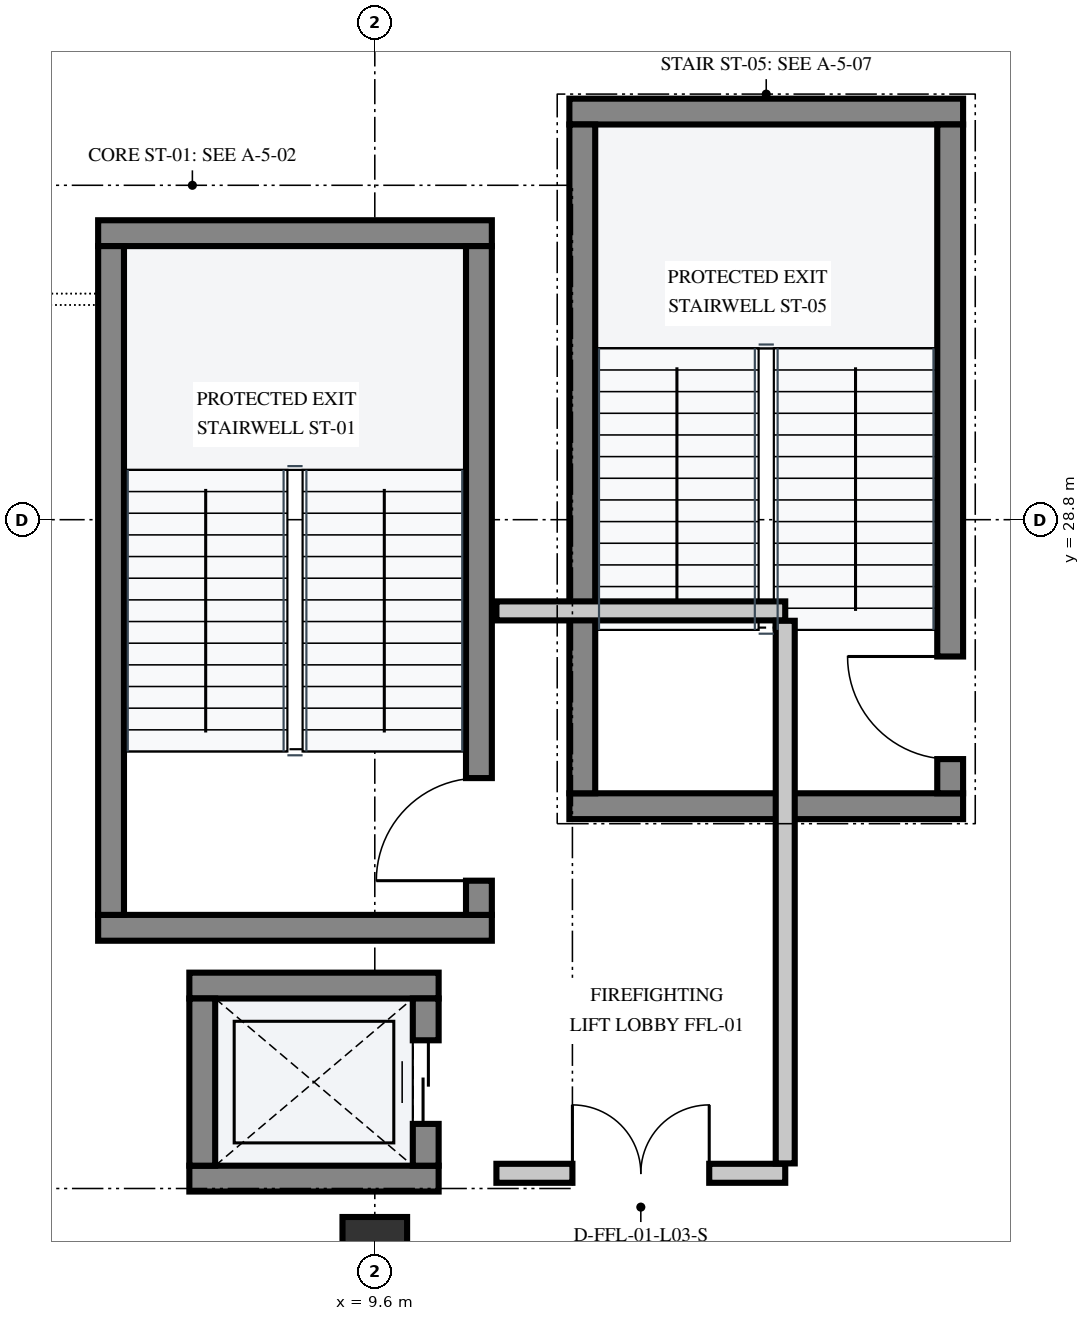
"""IFC4 building model, lengths in metres.
Left out: names, types, materials, properties, quantities, classifications, styles, units other than length and angle.
Written with IfcOpenShell. Run it as: python <this file> out.ifc"""

import sys

from ifc_helpers import new_model, si_unit, direction, frame, frame_2d, origin, origin_2d, place, context, subcontext, project, spatial, rectangle, extrude, element, fill, save


model = new_model("IFC4")
c1 = context("Model", 3, precision=1e-05, world=origin(), true_north=direction((0.0, 1.0)))
c2 = subcontext(c1, "Body", "Model", "MODEL_VIEW")
j1 = project(units=[si_unit("LENGTHUNIT", "METRE"), si_unit("PLANEANGLEUNIT", "RADIAN")], contexts=[c1])
p1 = place(None, origin())
s1 = spatial("IfcSite", under=j1, at=p1, CompositionType="ELEMENT")
p2 = place(p1, origin())
s2 = spatial("IfcBuilding", under=s1, at=p2, CompositionType="ELEMENT")
p3 = place(p2, frame((0.0, 0.0, 15.0)))
s3 = spatial("IfcBuildingStorey", under=s2, at=p3, CompositionType="ELEMENT", Elevation=15.0)
p4 = place(p3, frame((9.6, 19.2, 0.0), z_axis=(0.0, 0.0, 1.0), x_axis=(1.0, 0.0, 0.0)))
e1 = element("IfcColumn", 1, at=p4, inside=s3, PredefinedType="COLUMN", context=c2, shape_type="SweptSolid", body=[
    extrude(rectangle(XDim=0.85, YDim=0.85, at=origin_2d()), origin(), (0.0, 0.0, 1.0), 4.8),
])
for number, where, z_axis, x_axis in (
    (2, (5.96, 23.43, 0.0), (0.0, 0.0, 1.0), (1.0, 0.0, 0.0)),
    (3, (5.96, 32.57, 0.0), (0.0, 0.0, 1.0), (1.0, 0.0, 0.0)),
):
    element("IfcWall", number, at=place(p3, frame(where, z_axis=z_axis, x_axis=x_axis)), inside=s3, PredefinedType="SHEAR", context=c2, shape_type="SweptSolid", body=[
        extrude(rectangle(XDim=5.18, YDim=0.34, at=frame_2d((2.59, 0.0))), origin(), (0.0, 0.0, 1.0), 4.52),
    ])
p5 = place(p3, frame((10.97, 23.6, 0.0), z_axis=(0.0, 0.0, 1.0), x_axis=(0.0, 1.0, 0.0)))
e4 = element("IfcWall", 4, at=p5, inside=s3, PredefinedType="SHEAR", context=c2, shape_type="SweptSolid", body=[
    extrude(rectangle(XDim=8.8, YDim=0.34, at=frame_2d((4.4, 0.0))), origin(), (0.0, 0.0, 1.0), 4.52),
])
p6 = place(p5, frame((0.45, 0.0, 0.0)))
e5 = element("IfcOpeningElement", 5, at=p6, cuts=e4, PredefinedType="OPENING", context=c2, shape_type="SweptSolid", body=[
    extrude(rectangle(XDim=1.35, YDim=2.2, at=frame_2d((0.675, 1.1))), frame((0.0, 0.182, 0.0), z_axis=(0.0, -1.0, 0.0), x_axis=(1.0, 0.0, 0.0)), (0.0, 0.0, 1.0), 0.364),
])
p7 = place(p3, frame((6.13, 23.6, 0.0), z_axis=(0.0, 0.0, 1.0), x_axis=(0.0, 1.0, 0.0)))
e6 = element("IfcWall", 6, at=p7, inside=s3, PredefinedType="SHEAR", context=c2, shape_type="SweptSolid", body=[
    extrude(rectangle(XDim=8.8, YDim=0.34, at=frame_2d((4.4, 0.0))), origin(), (0.0, 0.0, 1.0), 4.52),
])
for number, where, z_axis, x_axis in (
    (7, (12.16, 25.03, 0.0), (0.0, 0.0, 1.0), (1.0, 0.0, 0.0)),
    (8, (12.16, 34.17, 0.0), (0.0, 0.0, 1.0), (1.0, 0.0, 0.0)),
):
    element("IfcWall", number, at=place(p3, frame(where, z_axis=z_axis, x_axis=x_axis)), inside=s3, PredefinedType="SHEAR", context=c2, shape_type="SweptSolid", body=[
        extrude(rectangle(XDim=5.18, YDim=0.34, at=frame_2d((2.59, 0.0))), origin(), (0.0, 0.0, 1.0), 4.52),
    ])
p8 = place(p3, frame((17.17, 25.2, 0.0), z_axis=(0.0, 0.0, 1.0), x_axis=(0.0, 1.0, 0.0)))
e9 = element("IfcWall", 9, at=p8, inside=s3, PredefinedType="SHEAR", context=c2, shape_type="SweptSolid", body=[
    extrude(rectangle(XDim=8.8, YDim=0.34, at=frame_2d((4.4, 0.0))), origin(), (0.0, 0.0, 1.0), 4.52),
])
p9 = place(p8, frame((0.45, 0.0, 0.0)))
e10 = element("IfcOpeningElement", 10, at=p9, cuts=e9, PredefinedType="OPENING", context=c2, shape_type="SweptSolid", body=[
    extrude(rectangle(XDim=1.35, YDim=2.2, at=frame_2d((0.675, 1.1))), frame((0.0, 0.182, 0.0), z_axis=(0.0, -1.0, 0.0), x_axis=(1.0, 0.0, 0.0)), (0.0, 0.0, 1.0), 0.364),
])
p10 = place(p3, frame((12.33, 25.2, 0.0), z_axis=(0.0, 0.0, 1.0), x_axis=(0.0, 1.0, 0.0)))
e11 = element("IfcWall", 11, at=p10, inside=s3, PredefinedType="SHEAR", context=c2, shape_type="SweptSolid", body=[
    extrude(rectangle(XDim=8.8, YDim=0.34, at=frame_2d((4.4, 0.0))), origin(), (0.0, 0.0, 1.0), 4.52),
])
for number, where, z_axis, x_axis in (
    (12, (7.16, 20.13, 0.0), (0.0, 0.0, 1.0), (1.0, 0.0, 0.0)),
    (13, (7.16, 22.67, 0.0), (0.0, 0.0, 1.0), (1.0, 0.0, 0.0)),
):
    element("IfcWall", number, at=place(p3, frame(where, z_axis=z_axis, x_axis=x_axis)), inside=s3, PredefinedType="SHEAR", context=c2, shape_type="SweptSolid", body=[
        extrude(rectangle(XDim=3.28, YDim=0.34, at=frame_2d((1.64, 0.0))), origin(), (0.0, 0.0, 1.0), 4.52),
    ])
p11 = place(p3, frame((7.33, 20.3, 0.0), z_axis=(0.0, 0.0, 1.0), x_axis=(0.0, 1.0, 0.0)))
e14 = element("IfcWall", 14, at=p11, inside=s3, PredefinedType="SHEAR", context=c2, shape_type="SweptSolid", body=[
    extrude(rectangle(XDim=2.2, YDim=0.34, at=frame_2d((1.1, 0.0))), origin(), (0.0, 0.0, 1.0), 4.52),
])
p12 = place(p3, frame((10.27, 20.3, 0.0), z_axis=(0.0, 0.0, 1.0), x_axis=(0.0, 1.0, 0.0)))
e15 = element("IfcWall", 15, at=p12, inside=s3, PredefinedType="SHEAR", context=c2, shape_type="SweptSolid", body=[
    extrude(rectangle(XDim=2.2, YDim=0.34, at=frame_2d((1.1, 0.0))), origin(), (0.0, 0.0, 1.0), 4.52),
])
p13 = place(p12, frame((0.55, 0.0, 0.0)))
e16 = element("IfcOpeningElement", 16, at=p13, cuts=e15, PredefinedType="OPENING", context=c2, shape_type="SweptSolid", body=[
    extrude(rectangle(XDim=1.1, YDim=2.15, at=frame_2d((0.55, 1.075))), frame((0.0, 0.182, 0.0), z_axis=(0.0, -1.0, 0.0), x_axis=(1.0, 0.0, 0.0)), (0.0, 0.0, 1.0), 0.364),
])
p14 = place(p3, frame((11.2, 20.2, 0.0), z_axis=(0.0, 0.0, 1.0), x_axis=(1.0, 0.0, 0.0)))
e17 = element("IfcWall", 17, at=p14, inside=s3, PredefinedType="PARTITIONING", context=c2, shape_type="SweptSolid", body=[
    extrude(rectangle(XDim=3.8, YDim=0.25, at=frame_2d((1.9, 0.0))), origin(), (0.0, 0.0, 1.0), 4.52),
])
p15 = place(p14, frame((1.0, 0.0, 0.0)))
e18 = element("IfcOpeningElement", 18, at=p15, cuts=e17, PredefinedType="OPENING", context=c2, shape_type="SweptSolid", body=[
    extrude(rectangle(XDim=1.8, YDim=2.25, at=frame_2d((0.9, 1.125))), frame((0.0, 0.137, 0.0), z_axis=(0.0, -1.0, 0.0), x_axis=(1.0, 0.0, 0.0)), (0.0, 0.0, 1.0), 0.274),
])
p16 = place(p3, frame((11.2, 27.6, 0.0), z_axis=(0.0, 0.0, 1.0), x_axis=(1.0, 0.0, 0.0)))
e19 = element("IfcWall", 19, at=p16, inside=s3, PredefinedType="PARTITIONING", context=c2, shape_type="SweptSolid", body=[
    extrude(rectangle(XDim=3.8, YDim=0.25, at=frame_2d((1.9, 0.0))), origin(), (0.0, 0.0, 1.0), 4.52),
])
p17 = place(p3, frame((15.0, 20.33, 0.0), z_axis=(0.0, 0.0, 1.0), x_axis=(0.0, 1.0, 0.0)))
e20 = element("IfcWall", 20, at=p17, inside=s3, PredefinedType="PARTITIONING", context=c2, shape_type="SweptSolid", body=[
    extrude(rectangle(XDim=7.14, YDim=0.25, at=frame_2d((3.57, 0.0))), origin(), (0.0, 0.0, 1.0), 4.52),
])
p18 = place(p6, origin())
e21 = element("IfcDoor", 21, at=p18, inside=s3, OperationType="SINGLE_SWING_LEFT", PredefinedType="DOOR", context=c2, shape_type="SweptSolid", body=[
    extrude(rectangle(XDim=1.35, YDim=2.2, at=frame_2d((0.675, 1.1))), frame((0.0, 0.025, 0.0), z_axis=(0.0, -1.0, 0.0), x_axis=(1.0, 0.0, 0.0)), (0.0, 0.0, 1.0), 0.05),
])
fill(e5, e21)
p19 = place(p9, origin())
e22 = element("IfcDoor", 22, at=p19, inside=s3, OperationType="SINGLE_SWING_RIGHT", PredefinedType="DOOR", context=c2, shape_type="SweptSolid", body=[
    extrude(rectangle(XDim=1.35, YDim=2.2, at=frame_2d((0.675, 1.1))), frame((0.0, 0.025, 0.0), z_axis=(0.0, -1.0, 0.0), x_axis=(1.0, 0.0, 0.0)), (0.0, 0.0, 1.0), 0.05),
])
fill(e10, e22)
p20 = place(p13, origin())
e23 = element("IfcDoor", 23, at=p20, inside=s3, OperationType="DOUBLE_DOOR_SLIDING", PredefinedType="DOOR", context=c2, shape_type="SweptSolid", body=[
    extrude(rectangle(XDim=1.1, YDim=2.15, at=frame_2d((0.55, 1.075))), frame((0.0, 0.025, 0.0), z_axis=(0.0, -1.0, 0.0), x_axis=(1.0, 0.0, 0.0)), (0.0, 0.0, 1.0), 0.05),
])
fill(e16, e23)
p21 = place(p15, origin())
e24 = element("IfcDoor", 24, at=p21, inside=s3, OperationType="DOUBLE_DOOR_SINGLE_SWING", PredefinedType="DOOR", context=c2, shape_type="SweptSolid", body=[
    extrude(rectangle(XDim=1.8, YDim=2.25, at=frame_2d((0.9, 1.125))), frame((0.0, 0.025, 0.0), z_axis=(0.0, -1.0, 0.0), x_axis=(1.0, 0.0, 0.0)), (0.0, 0.0, 1.0), 0.05),
])
fill(e18, e24)
save(model, sys.argv[1])
